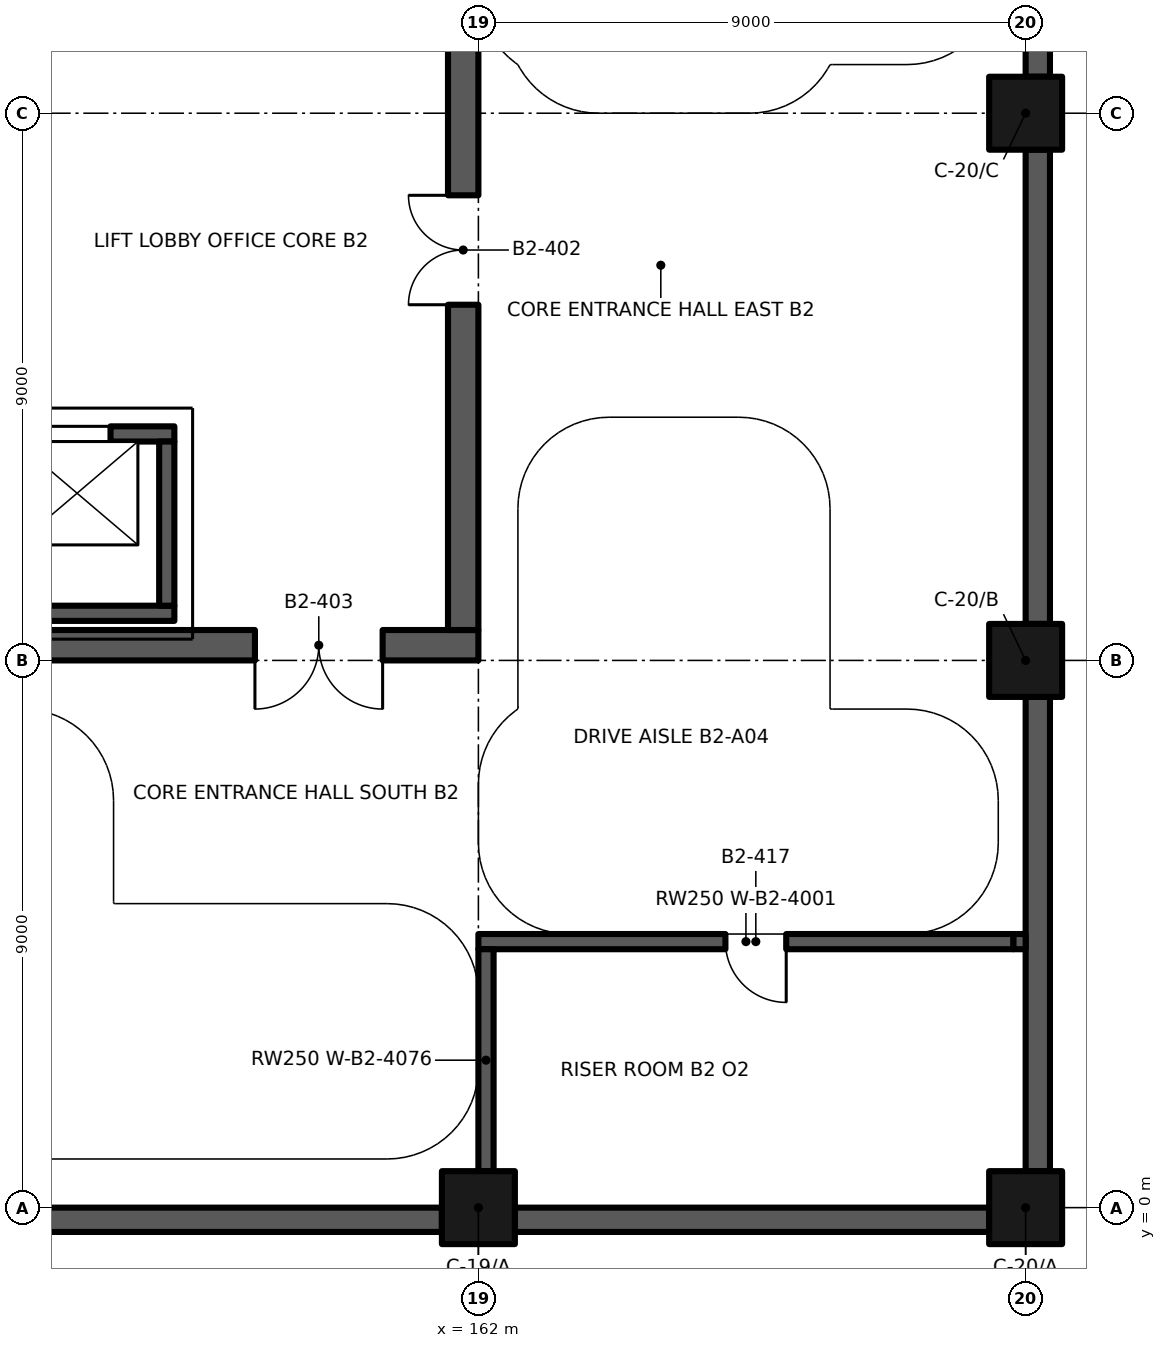
"""IFC4 building model, lengths in metres.
Left out: names, types, materials, properties, quantities, classifications, styles, units other than length and angle.
Written with IfcOpenShell. Run it as: python <this file> out.ifc"""

import sys

from ifc_helpers import new_model, si_unit, direction, frame, frame_2d, origin, origin_2d, place, context, subcontext, project, spatial, rectangle, extrude, element, fill, save


model = new_model("IFC4")
c1 = context("Model", 3, precision=1e-05, world=origin(), true_north=direction((0.0, 1.0)))
c2 = subcontext(c1, "Body", "Model", "MODEL_VIEW")
j1 = project(units=[si_unit("LENGTHUNIT", "METRE"), si_unit("PLANEANGLEUNIT", "RADIAN")], contexts=[c1])
p1 = place(None, origin())
s1 = spatial("IfcSite", under=j1, at=p1, CompositionType="ELEMENT")
p2 = place(p1, origin())
s2 = spatial("IfcBuilding", under=s1, at=p2, CompositionType="ELEMENT")
p3 = place(p2, frame((0.0, 0.0, -9.9)))
s3 = spatial("IfcBuildingStorey", under=s2, at=p3, CompositionType="ELEMENT", Elevation=-9.9)
for number, where, z_axis, x_axis in (
    (1, (153.6, -0.2, -0.5), (0.0, 0.0, 1.0), (1.0, 0.0, 0.0)),
    (2, (162.6, -0.2, -0.5), (0.0, 0.0, 1.0), (1.0, 0.0, 0.0)),
    (3, (171.2, 0.6, -0.5), (0.0, 0.0, 1.0), (0.0, 1.0, 0.0)),
    (4, (171.2, 9.6, -0.5), (0.0, 0.0, 1.0), (0.0, 1.0, 0.0)),
    (5, (171.2, 18.6, -0.5), (0.0, 0.0, 1.0), (0.0, 1.0, 0.0)),
):
    element("IfcWall", number, at=place(p3, frame(where, z_axis=z_axis, x_axis=x_axis)), inside=s3, PredefinedType="SOLIDWALL", context=c2, shape_type="SweptSolid", body=[
        extrude(rectangle(XDim=7.8, YDim=0.4, at=frame_2d((3.9, 0.0))), origin(), (0.0, 0.0, 1.0), 5.3),
    ])
for number, where, z_axis, x_axis in (
    (6, (162.0, 0.0, 0.0), (0.0, 0.0, 1.0), (1.0, 0.0, 0.0)),
    (7, (171.0, 0.0, 0.0), (0.0, 0.0, 1.0), (1.0, 0.0, 0.0)),
    (8, (171.0, 9.0, 0.0), (0.0, 0.0, 1.0), (1.0, 0.0, 0.0)),
    (9, (171.0, 18.0, 0.0), (0.0, 0.0, 1.0), (1.0, 0.0, 0.0)),
):
    element("IfcColumn", number, at=place(p3, frame(where, z_axis=z_axis, x_axis=x_axis)), inside=s3, PredefinedType="COLUMN", context=c2, shape_type="SweptSolid", body=[
        extrude(rectangle(XDim=1.2, YDim=1.2, at=origin_2d()), origin(), (0.0, 0.0, 1.0), 4.8),
    ])
p4 = place(p3, frame((144.95, 12.725, -1.6), z_axis=(0.0, 0.0, 1.0), x_axis=(1.0, 0.0, 0.0)))
e10 = element("IfcWall", 10, at=p4, inside=s3, PredefinedType="SHEAR", context=c2, shape_type="SweptSolid", body=[
    extrude(rectangle(XDim=12.05, YDim=0.25, at=frame_2d((6.025, 0.0))), origin(), (0.0, 0.0, 1.0), 6.4),
])
p5 = place(p4, frame((1.05, 0.0, 1.6)))
e11 = element("IfcOpeningElement", 11, at=p5, cuts=e10, PredefinedType="OPENING", context=c2, shape_type="SweptSolid", body=[
    extrude(rectangle(XDim=1.1, YDim=2.1, at=frame_2d((0.55, 1.05))), frame((0.0, 0.135, 0.0), z_axis=(0.0, -1.0, 0.0), x_axis=(1.0, 0.0, 0.0)), (0.0, 0.0, 1.0), 0.27),
])
p6 = place(p4, frame((4.0, 0.0, 1.6)))
e12 = element("IfcOpeningElement", 12, at=p6, cuts=e10, PredefinedType="OPENING", context=c2, shape_type="SweptSolid", body=[
    extrude(rectangle(XDim=1.1, YDim=2.1, at=frame_2d((0.55, 1.05))), frame((0.0, 0.135, 0.0), z_axis=(0.0, -1.0, 0.0), x_axis=(1.0, 0.0, 0.0)), (0.0, 0.0, 1.0), 0.27),
])
p7 = place(p4, frame((6.95, 0.0, 1.6)))
e13 = element("IfcOpeningElement", 13, at=p7, cuts=e10, PredefinedType="OPENING", context=c2, shape_type="SweptSolid", body=[
    extrude(rectangle(XDim=1.1, YDim=2.1, at=frame_2d((0.55, 1.05))), frame((0.0, 0.135, 0.0), z_axis=(0.0, -1.0, 0.0), x_axis=(1.0, 0.0, 0.0)), (0.0, 0.0, 1.0), 0.27),
])
p8 = place(p4, frame((9.9, 0.0, 1.6)))
e14 = element("IfcOpeningElement", 14, at=p8, cuts=e10, PredefinedType="OPENING", context=c2, shape_type="SweptSolid", body=[
    extrude(rectangle(XDim=1.1, YDim=2.1, at=frame_2d((0.55, 1.05))), frame((0.0, 0.135, 0.0), z_axis=(0.0, -1.0, 0.0), x_axis=(1.0, 0.0, 0.0)), (0.0, 0.0, 1.0), 0.27),
])
p9 = place(p3, frame((144.95, 9.775, -1.6), z_axis=(0.0, 0.0, 1.0), x_axis=(1.0, 0.0, 0.0)))
e15 = element("IfcWall", 15, at=p9, inside=s3, PredefinedType="SHEAR", context=c2, shape_type="SweptSolid", body=[
    extrude(rectangle(XDim=12.05, YDim=0.25, at=frame_2d((6.025, 0.0))), origin(), (0.0, 0.0, 1.0), 6.4),
])
p10 = place(p3, frame((156.875, 9.9, -1.6), z_axis=(0.0, 0.0, 1.0), x_axis=(0.0, 1.0, 0.0)))
e16 = element("IfcWall", 16, at=p10, inside=s3, PredefinedType="SHEAR", context=c2, shape_type="SweptSolid", body=[
    extrude(rectangle(XDim=2.7, YDim=0.25, at=frame_2d((1.35, 0.0))), origin(), (0.0, 0.0, 1.0), 6.4),
])
p11 = place(p3, frame((162.0, 4.375, 0.0), z_axis=(0.0, 0.0, 1.0), x_axis=(1.0, 0.0, 0.0)))
e17 = element("IfcWall", 17, at=p11, inside=s3, PredefinedType="SOLIDWALL", context=c2, shape_type="SweptSolid", body=[
    extrude(rectangle(XDim=8.8, YDim=0.25, at=frame_2d((4.4, 0.0))), origin(), (0.0, 0.0, 1.0), 4.5),
])
p12 = place(p11, frame((5.062, 0.0, 0.0), z_axis=(0.0, 0.0, 1.0), x_axis=(-1.0, 0.0, 0.0)))
e18 = element("IfcOpeningElement", 18, at=p12, cuts=e17, PredefinedType="OPENING", context=c2, shape_type="SweptSolid", body=[
    extrude(rectangle(XDim=1.0, YDim=2.1, at=frame_2d((0.5, 1.05))), frame((0.0, 0.135, 0.0), z_axis=(0.0, -1.0, 0.0), x_axis=(1.0, 0.0, 0.0)), (0.0, 0.0, 1.0), 0.27),
])
p13 = place(p3, frame((170.8, 4.375, 0.0), z_axis=(0.0, 0.0, 1.0), x_axis=(1.0, 0.0, 0.0)))
e19 = element("IfcWall", 19, at=p13, inside=s3, PredefinedType="SOLIDWALL", context=c2, shape_type="SweptSolid", body=[
    extrude(rectangle(XDim=0.2, YDim=0.25, at=frame_2d((0.1, 0.0))), origin(), (0.0, 0.0, 1.0), 4.0),
])
p14 = place(p3, frame((144.0, 9.25, 0.0), z_axis=(0.0, 0.0, 1.0), x_axis=(1.0, 0.0, 0.0)))
e20 = element("IfcWall", 20, at=p14, inside=s3, PredefinedType="SHEAR", context=c2, shape_type="SweptSolid", body=[
    extrude(rectangle(XDim=18.0, YDim=0.5, at=frame_2d((9.0, 0.0))), origin(), (0.0, 0.0, 1.0), 4.5),
])
p15 = place(p14, frame((16.425, 0.0, 0.0), z_axis=(0.0, 0.0, 1.0), x_axis=(-1.0, 0.0, 0.0)))
e21 = element("IfcOpeningElement", 21, at=p15, cuts=e20, PredefinedType="OPENING", context=c2, shape_type="SweptSolid", body=[
    extrude(rectangle(XDim=2.1, YDim=2.4, at=frame_2d((1.05, 1.2))), frame((0.0, 0.26, 0.0), z_axis=(0.0, -1.0, 0.0), x_axis=(1.0, 0.0, 0.0)), (0.0, 0.0, 1.0), 0.52),
])
p16 = place(p3, frame((161.75, 9.5, 0.0), z_axis=(0.0, 0.0, 1.0), x_axis=(0.0, 1.0, 0.0)))
e22 = element("IfcWall", 22, at=p16, inside=s3, PredefinedType="SHEAR", context=c2, shape_type="SweptSolid", body=[
    extrude(rectangle(XDim=17.5, YDim=0.5, at=frame_2d((8.75, 0.0))), origin(), (0.0, 0.0, 1.0), 4.5),
])
p17 = place(p16, frame((5.35, 0.0, 0.0)))
e23 = element("IfcOpeningElement", 23, at=p17, cuts=e22, PredefinedType="OPENING", context=c2, shape_type="SweptSolid", body=[
    extrude(rectangle(XDim=1.8, YDim=2.4, at=frame_2d((0.9, 1.2))), frame((0.0, 0.26, 0.0), z_axis=(0.0, -1.0, 0.0), x_axis=(1.0, 0.0, 0.0)), (0.0, 0.0, 1.0), 0.52),
])
p18 = place(p3, frame((162.125, 0.6, 0.0), z_axis=(0.0, 0.0, 1.0), x_axis=(0.0, 1.0, 0.0)))
e24 = element("IfcWall", 24, at=p18, inside=s3, PredefinedType="SOLIDWALL", context=c2, shape_type="SweptSolid", body=[
    extrude(rectangle(XDim=3.65, YDim=0.25, at=frame_2d((1.825, 0.0))), origin(), (0.0, 0.0, 1.0), 4.5),
])
p19 = place(p8, origin())
e25 = element("IfcDoor", 25, at=p19, inside=s3, OperationType="DOUBLE_DOOR_SLIDING", PredefinedType="DOOR", context=c2, shape_type="SweptSolid", body=[
    extrude(rectangle(XDim=1.1, YDim=2.1, at=frame_2d((0.55, 1.05))), frame((0.0, 0.025, 0.0), z_axis=(0.0, -1.0, 0.0), x_axis=(1.0, 0.0, 0.0)), (0.0, 0.0, 1.0), 0.05),
])
fill(e14, e25)
p20 = place(p17, origin())
e26 = element("IfcDoor", 26, at=p20, inside=s3, OperationType="DOUBLE_DOOR_SINGLE_SWING", PredefinedType="DOOR", context=c2, shape_type="SweptSolid", body=[
    extrude(rectangle(XDim=1.8, YDim=2.4, at=frame_2d((0.9, 1.2))), frame((0.0, 0.025, 0.0), z_axis=(0.0, -1.0, 0.0), x_axis=(1.0, 0.0, 0.0)), (0.0, 0.0, 1.0), 0.05),
])
fill(e23, e26)
p21 = place(p15, origin())
e27 = element("IfcDoor", 27, at=p21, inside=s3, OperationType="DOUBLE_DOOR_SINGLE_SWING", PredefinedType="DOOR", context=c2, shape_type="SweptSolid", body=[
    extrude(rectangle(XDim=2.1, YDim=2.4, at=frame_2d((1.05, 1.2))), frame((0.0, 0.025, 0.0), z_axis=(0.0, -1.0, 0.0), x_axis=(1.0, 0.0, 0.0)), (0.0, 0.0, 1.0), 0.05),
])
fill(e21, e27)
p22 = place(p12, origin())
e28 = element("IfcDoor", 28, at=p22, inside=s3, OperationType="SINGLE_SWING_LEFT", PredefinedType="DOOR", context=c2, shape_type="SweptSolid", body=[
    extrude(rectangle(XDim=1.0, YDim=2.1, at=frame_2d((0.5, 1.05))), frame((0.0, 0.025, 0.0), z_axis=(0.0, -1.0, 0.0), x_axis=(1.0, 0.0, 0.0)), (0.0, 0.0, 1.0), 0.05),
])
fill(e18, e28)
save(model, sys.argv[1])
